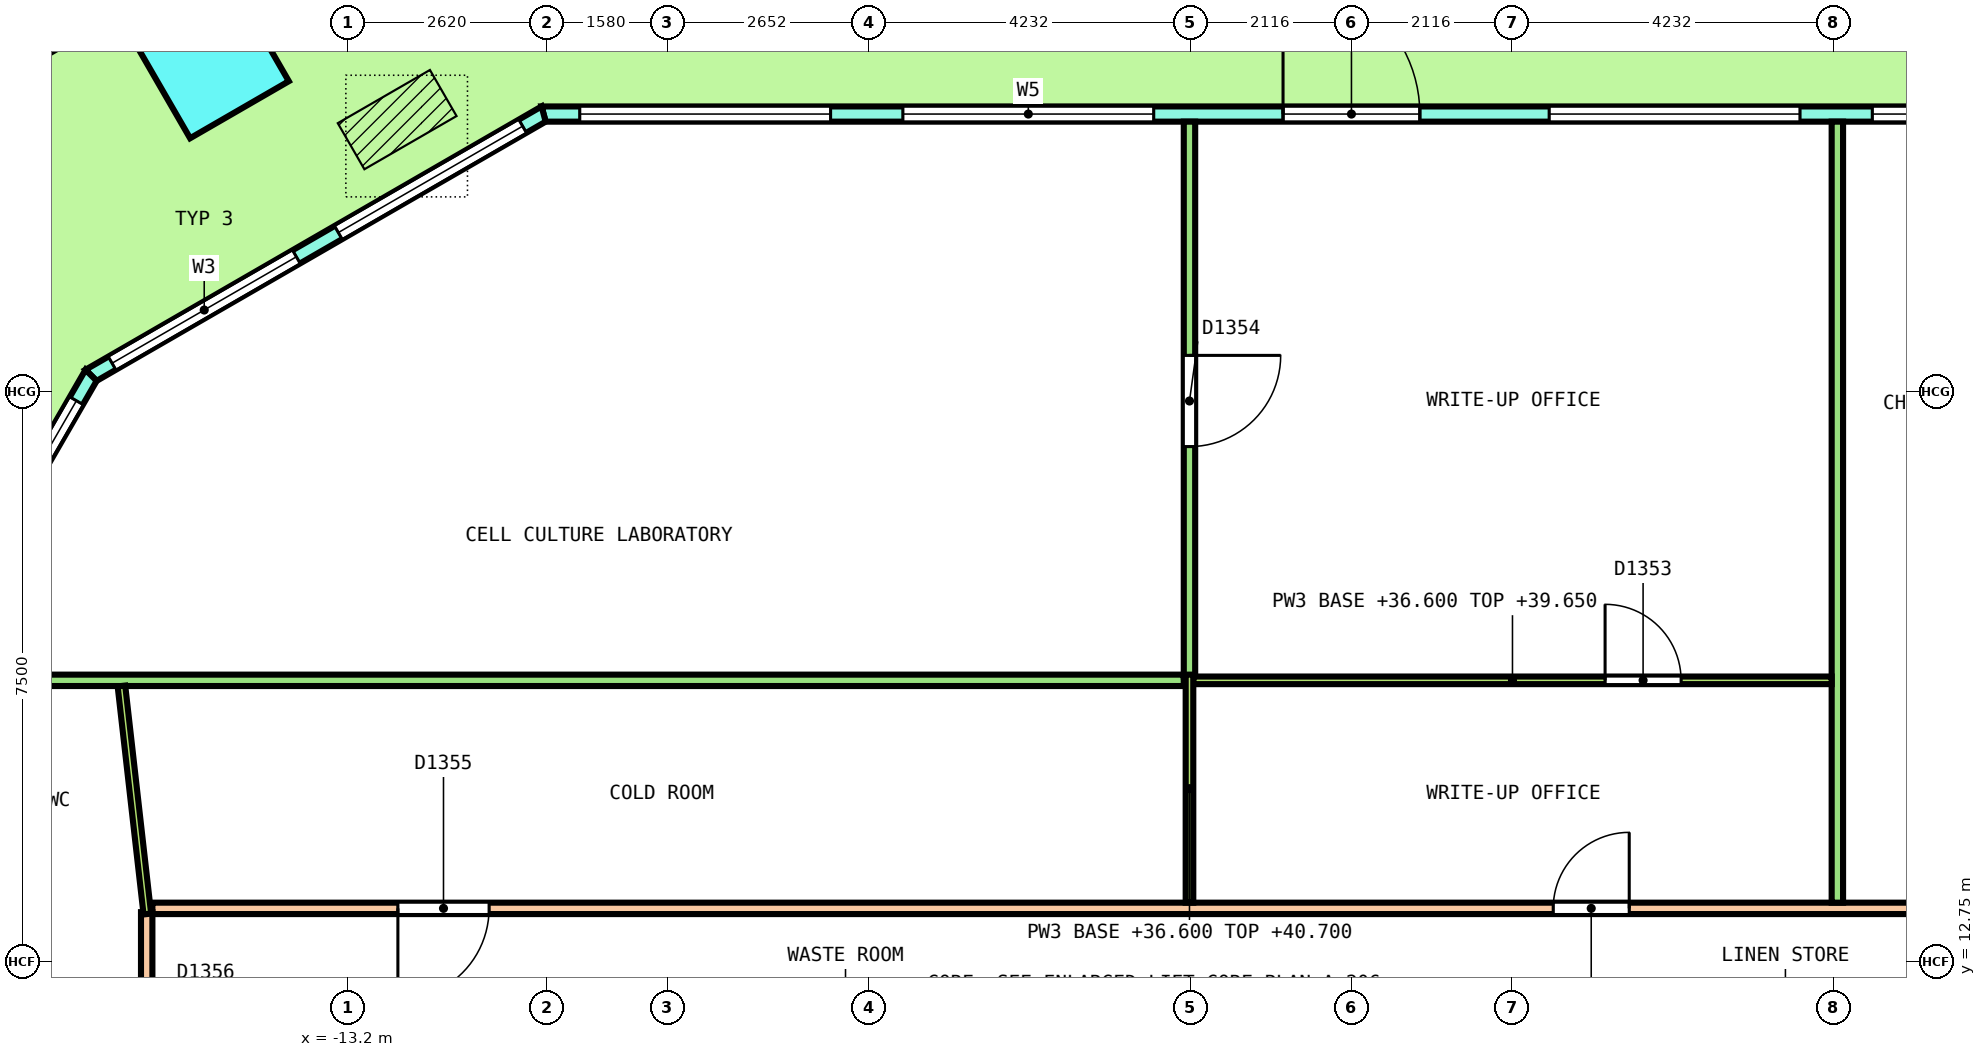
"""IFC4 building model, lengths in metres.
Left out: names, types, materials, properties, quantities, classifications, styles, units other than length and angle.
Written with IfcOpenShell. Run it as: python <this file> out.ifc"""

import sys

from ifc_helpers import new_model, si_unit, direction, frame, frame_2d, origin, origin_2d, place, context, subcontext, project, spatial, polyline, rectangle, outline, extrude, element, fill, save


model = new_model("IFC4")
c1 = context("Model", 3, precision=1e-05, world=origin(), true_north=direction((0.0, 1.0)))
c2 = subcontext(c1, "Body", "Model", "MODEL_VIEW")
j1 = project(units=[si_unit("LENGTHUNIT", "METRE"), si_unit("PLANEANGLEUNIT", "RADIAN")], contexts=[c1])
p1 = place(None, origin())
s1 = spatial("IfcSite", under=j1, at=p1, CompositionType="ELEMENT")
p2 = place(p1, origin())
s2 = spatial("IfcBuilding", under=s1, at=p2, CompositionType="ELEMENT")
p3 = place(p2, frame((0.0, 0.0, 36.6)))
s3 = spatial("IfcBuildingStorey", under=s2, at=p3, CompositionType="ELEMENT", Elevation=36.6)
p4 = place(p3, frame((-15.005, 24.606, 0.0), z_axis=(-0.036267419622, 0.0, 0.999342120734), x_axis=(-0.865313477853, -0.500246354177, -0.031403346616)))
e1 = element("IfcColumn", 1, at=p4, inside=s3, PredefinedType="COLUMN", context=c2, shape_type="SweptSolid", body=[
    extrude(rectangle(XDim=1.5, YDim=1.5, at=origin_2d()), origin(), (0.0, 0.0, 1.0), 4.052),
])
p5 = place(p3, frame((10.628, 23.9, 0.0), z_axis=(0.0, 0.0, 1.0), x_axis=(-1.0, 0.0, 0.0)))
e2 = element("IfcWall", 2, at=p5, inside=s3, PredefinedType="SOLIDWALL", context=c2, shape_type="SweptSolid", body=[
    extrude(outline(polyline([(-0.027, -0.1), (0.988, -0.1), (2.003, -0.1), (3.017, -0.1), (4.032, -0.1), (5.047, -0.1), (6.062, -0.1), (7.076, -0.1), (8.091, -0.1), (9.106, -0.1), (10.121, -0.1), (11.135, -0.1), (12.15, -0.1), (13.165, -0.1), (14.179, -0.1), (15.194, -0.1), (16.209, -0.1), (17.224, -0.1), (18.239, -0.1), (19.253, -0.1), (20.268, -0.1), (21.283, -0.1), (21.229, 0.1), (20.219, 0.1), (19.21, 0.1), (18.2, 0.1), (17.19, 0.1), (16.181, 0.1), (15.171, 0.1), (14.162, 0.1), (13.152, 0.1), (12.142, 0.1), (11.133, 0.1), (10.123, 0.1), (9.114, 0.1), (8.104, 0.1), (7.094, 0.1), (6.085, 0.1), (5.075, 0.1), (4.065, 0.1), (3.056, 0.1), (2.046, 0.1), (1.036, 0.1), (0.027, 0.1), (-0.027, -0.1)])), origin(), (0.0, 0.0, 1.0), 4.1),
])
p6 = place(p5, frame((0.476, 0.0, 0.1)))
e3 = element("IfcOpeningElement", 3, at=p6, cuts=e2, PredefinedType="OPENING", context=c2, shape_type="SweptSolid", body=[
    extrude(rectangle(XDim=3.3, YDim=2.9, at=frame_2d((1.65, 1.45))), frame((0.0, 0.11, 0.0), z_axis=(0.0, -1.0, 0.0), x_axis=(1.0, 0.0, 0.0)), (0.0, 0.0, 1.0), 0.22),
])
p7 = place(p5, frame((4.727, 0.0, 0.1)))
e4 = element("IfcOpeningElement", 4, at=p7, cuts=e2, PredefinedType="OPENING", context=c2, shape_type="SweptSolid", body=[
    extrude(rectangle(XDim=3.3, YDim=2.9, at=frame_2d((1.65, 1.45))), frame((0.0, 0.11, 0.0), z_axis=(0.0, -1.0, 0.0), x_axis=(1.0, 0.0, 0.0)), (0.0, 0.0, 1.0), 0.22),
])
p8 = place(p5, frame((9.728, 0.0, 0.0)))
e5 = element("IfcOpeningElement", 5, at=p8, cuts=e2, PredefinedType="OPENING", context=c2, shape_type="SweptSolid", body=[
    extrude(rectangle(XDim=1.8, YDim=2.4, at=frame_2d((0.9, 1.2))), frame((0.0, 0.11, 0.0), z_axis=(0.0, -1.0, 0.0), x_axis=(1.0, 0.0, 0.0)), (0.0, 0.0, 1.0), 0.22),
])
p9 = place(p5, frame((9.728, 0.0, 2.55)))
e6 = element("IfcOpeningElement", 6, at=p9, cuts=e2, PredefinedType="OPENING", context=c2, shape_type="SweptSolid", body=[
    extrude(rectangle(XDim=1.8, YDim=0.45, at=frame_2d((0.9, 0.225))), frame((0.0, 0.11, 0.0), z_axis=(0.0, -1.0, 0.0), x_axis=(1.0, 0.0, 0.0)), (0.0, 0.0, 1.0), 0.22),
])
p10 = place(p5, frame((13.229, 0.0, 0.1)))
e7 = element("IfcOpeningElement", 7, at=p10, cuts=e2, PredefinedType="OPENING", context=c2, shape_type="SweptSolid", body=[
    extrude(rectangle(XDim=3.3, YDim=2.9, at=frame_2d((1.65, 1.45))), frame((0.0, 0.11, 0.0), z_axis=(0.0, -1.0, 0.0), x_axis=(1.0, 0.0, 0.0)), (0.0, 0.0, 1.0), 0.22),
])
p11 = place(p5, frame((17.48, 0.0, 0.1)))
e8 = element("IfcOpeningElement", 8, at=p11, cuts=e2, PredefinedType="OPENING", context=c2, shape_type="SweptSolid", body=[
    extrude(rectangle(XDim=3.3, YDim=2.9, at=frame_2d((1.65, 1.45))), frame((0.0, 0.11, 0.0), z_axis=(0.0, -1.0, 0.0), x_axis=(1.0, 0.0, 0.0)), (0.0, 0.0, 1.0), 0.22),
])
p12 = place(p3, frame((-10.628, 23.9, 0.0), z_axis=(0.0, 0.0, 1.0), x_axis=(-0.866029458321, -0.49999297727, 0.0)))
e9 = element("IfcWall", 9, at=p12, inside=s3, PredefinedType="SOLIDWALL", context=c2, shape_type="SweptSolid", body=[
    extrude(outline(polyline([(-0.027, -0.1), (1.128, -0.1), (2.282, -0.1), (3.437, -0.1), (4.592, -0.1), (5.747, -0.1), (6.901, -0.1), (6.848, 0.1), (5.711, 0.1), (4.574, 0.1), (3.437, 0.1), (2.301, 0.1), (1.164, 0.1), (0.027, 0.1), (-0.027, -0.1)])), origin(), (0.0, 0.0, 1.0), 4.1),
])
p13 = place(p12, frame((0.319, 0.0, 0.1)))
e10 = element("IfcOpeningElement", 10, at=p13, cuts=e9, PredefinedType="OPENING", context=c2, shape_type="SweptSolid", body=[
    extrude(rectangle(XDim=2.8, YDim=2.9, at=frame_2d((1.4, 1.45))), frame((0.0, 0.11, 0.0), z_axis=(0.0, -1.0, 0.0), x_axis=(1.0, 0.0, 0.0)), (0.0, 0.0, 1.0), 0.22),
])
p14 = place(p12, frame((3.756, 0.0, 0.1)))
e11 = element("IfcOpeningElement", 11, at=p14, cuts=e9, PredefinedType="OPENING", context=c2, shape_type="SweptSolid", body=[
    extrude(rectangle(XDim=2.8, YDim=2.9, at=frame_2d((1.4, 1.45))), frame((0.0, 0.11, 0.0), z_axis=(0.0, -1.0, 0.0), x_axis=(1.0, 0.0, 0.0)), (0.0, 0.0, 1.0), 0.22),
])
p15 = place(p3, frame((-16.582, 20.463, 0.0), z_axis=(0.0, 0.0, 1.0), x_axis=(-0.499999588275, -0.866025641494, 0.0)))
e12 = element("IfcWall", 12, at=p15, inside=s3, PredefinedType="SOLIDWALL", context=c2, shape_type="SweptSolid", body=[
    extrude(outline(polyline([(-0.027, -0.1), (1.024, -0.1), (2.075, -0.1), (3.125, -0.1), (4.176, -0.1), (5.227, -0.1), (6.278, -0.1), (7.329, -0.1), (8.38, -0.1), (9.43, -0.1), (10.481, -0.1), (11.532, -0.1), (12.583, -0.1), (13.634, -0.1), (14.685, -0.1), (15.735, -0.1), (16.786, -0.1), (17.837, -0.1), (18.888, -0.1), (18.834, 0.1), (17.789, 0.1), (16.744, 0.1), (15.699, 0.1), (14.655, 0.1), (13.61, 0.1), (12.565, 0.1), (11.52, 0.1), (10.475, 0.1), (9.43, 0.1), (8.385, 0.1), (7.341, 0.1), (6.296, 0.1), (5.251, 0.1), (4.206, 0.1), (3.161, 0.1), (2.116, 0.1), (1.072, 0.1), (0.027, 0.1), (-0.027, -0.1)])), origin(), (0.0, 0.0, 1.0), 4.1),
])
p16 = place(p15, frame((0.386, 0.0, 0.1)))
e13 = element("IfcOpeningElement", 13, at=p16, cuts=e12, PredefinedType="OPENING", context=c2, shape_type="SweptSolid", body=[
    extrude(rectangle(XDim=3.0, YDim=2.9, at=frame_2d((1.5, 1.45))), frame((0.0, 0.11, 0.0), z_axis=(0.0, -1.0, 0.0), x_axis=(1.0, 0.0, 0.0)), (0.0, 0.0, 1.0), 0.22),
])
p17 = place(p15, frame((4.158, 0.0, 0.1)))
e14 = element("IfcOpeningElement", 14, at=p17, cuts=e12, PredefinedType="OPENING", context=c2, shape_type="SweptSolid", body=[
    extrude(rectangle(XDim=3.0, YDim=2.9, at=frame_2d((1.5, 1.45))), frame((0.0, 0.11, 0.0), z_axis=(0.0, -1.0, 0.0), x_axis=(1.0, 0.0, 0.0)), (0.0, 0.0, 1.0), 0.22),
])
p18 = place(p15, frame((8.531, 0.0, 0.0)))
e15 = element("IfcOpeningElement", 15, at=p18, cuts=e12, PredefinedType="OPENING", context=c2, shape_type="SweptSolid", body=[
    extrude(rectangle(XDim=1.8, YDim=2.4, at=frame_2d((0.9, 1.2))), frame((0.0, 0.11, 0.0), z_axis=(0.0, -1.0, 0.0), x_axis=(1.0, 0.0, 0.0)), (0.0, 0.0, 1.0), 0.22),
])
p19 = place(p15, frame((8.531, 0.0, 2.55)))
e16 = element("IfcOpeningElement", 16, at=p19, cuts=e12, PredefinedType="OPENING", context=c2, shape_type="SweptSolid", body=[
    extrude(rectangle(XDim=1.8, YDim=0.45, at=frame_2d((0.9, 0.225))), frame((0.0, 0.11, 0.0), z_axis=(0.0, -1.0, 0.0), x_axis=(1.0, 0.0, 0.0)), (0.0, 0.0, 1.0), 0.22),
])
p20 = place(p15, frame((11.703, 0.0, 0.1)))
e17 = element("IfcOpeningElement", 17, at=p20, cuts=e12, PredefinedType="OPENING", context=c2, shape_type="SweptSolid", body=[
    extrude(rectangle(XDim=3.0, YDim=2.9, at=frame_2d((1.5, 1.45))), frame((0.0, 0.11, 0.0), z_axis=(0.0, -1.0, 0.0), x_axis=(1.0, 0.0, 0.0)), (0.0, 0.0, 1.0), 0.22),
])
p21 = place(p15, frame((15.475, 0.0, 0.1)))
e18 = element("IfcOpeningElement", 18, at=p21, cuts=e12, PredefinedType="OPENING", context=c2, shape_type="SweptSolid", body=[
    extrude(rectangle(XDim=3.0, YDim=2.9, at=frame_2d((1.5, 1.45))), frame((0.0, 0.11, 0.0), z_axis=(0.0, -1.0, 0.0), x_axis=(1.0, 0.0, 0.0)), (0.0, 0.0, 1.0), 0.22),
])
p22 = place(p3, frame((-15.775, 13.45, 0.0), z_axis=(0.0, 0.0, 1.0), x_axis=(1.0, 0.0, 0.0)))
e19 = element("IfcWall", 19, at=p22, inside=s3, PredefinedType="PARTITIONING", context=c2, shape_type="SweptSolid", body=[
    extrude(rectangle(XDim=31.55, YDim=0.15, at=frame_2d((15.775, 0.0))), origin(), (0.0, 0.0, 1.0), 3.05),
])
p23 = place(p22, frame((28.527, 0.0, 0.0)))
e20 = element("IfcOpeningElement", 20, at=p23, cuts=e19, PredefinedType="OPENING", context=c2, shape_type="SweptSolid", body=[
    extrude(rectangle(XDim=1.0, YDim=2.1, at=frame_2d((0.5, 1.05))), frame((0.0, 0.085, 0.0), z_axis=(0.0, -1.0, 0.0), x_axis=(1.0, 0.0, 0.0)), (0.0, 0.0, 1.0), 0.17),
])
p24 = place(p22, frame((24.289, 0.0, 0.0)))
e21 = element("IfcOpeningElement", 21, at=p24, cuts=e19, PredefinedType="OPENING", context=c2, shape_type="SweptSolid", body=[
    extrude(rectangle(XDim=1.2, YDim=2.1, at=frame_2d((0.6, 1.05))), frame((0.0, 0.085, 0.0), z_axis=(0.0, -1.0, 0.0), x_axis=(1.0, 0.0, 0.0)), (0.0, 0.0, 1.0), 0.17),
])
p25 = place(p22, frame((18.429, 0.0, 0.0)))
e22 = element("IfcOpeningElement", 22, at=p25, cuts=e19, PredefinedType="OPENING", context=c2, shape_type="SweptSolid", body=[
    extrude(rectangle(XDim=1.0, YDim=2.1, at=frame_2d((0.5, 1.05))), frame((0.0, 0.085, 0.0), z_axis=(0.0, -1.0, 0.0), x_axis=(1.0, 0.0, 0.0)), (0.0, 0.0, 1.0), 0.17),
])
p26 = place(p22, frame((3.23, 0.0, 0.0)))
e23 = element("IfcOpeningElement", 23, at=p26, cuts=e19, PredefinedType="OPENING", context=c2, shape_type="SweptSolid", body=[
    extrude(rectangle(XDim=1.2, YDim=2.1, at=frame_2d((0.6, 1.05))), frame((0.0, 0.085, 0.0), z_axis=(0.0, -1.0, 0.0), x_axis=(1.0, 0.0, 0.0)), (0.0, 0.0, 1.0), 0.17),
])
p27 = place(p3, frame((-15.85, -13.375, 0.0), z_axis=(0.0, 0.0, 1.0), x_axis=(0.0, 1.0, 0.0)))
e24 = element("IfcWall", 24, at=p27, inside=s3, PredefinedType="PARTITIONING", context=c2, shape_type="SweptSolid", body=[
    extrude(rectangle(XDim=26.775, YDim=0.15, at=frame_2d((13.387, 0.0))), origin(), (0.0, 0.0, 1.0), 3.05),
])
p28 = place(p27, frame((24.693, 0.0, 0.0)))
e25 = element("IfcOpeningElement", 25, at=p28, cuts=e24, PredefinedType="OPENING", context=c2, shape_type="SweptSolid", body=[
    extrude(rectangle(XDim=1.0, YDim=2.1, at=frame_2d((0.5, 1.05))), frame((0.0, 0.085, 0.0), z_axis=(0.0, -1.0, 0.0), x_axis=(1.0, 0.0, 0.0)), (0.0, 0.0, 1.0), 0.17),
])
p29 = place(p27, frame((16.495, 0.0, 0.0)))
e26 = element("IfcOpeningElement", 26, at=p29, cuts=e24, PredefinedType="OPENING", context=c2, shape_type="SweptSolid", body=[
    extrude(rectangle(XDim=1.0, YDim=2.1, at=frame_2d((0.5, 1.05))), frame((0.0, 0.085, 0.0), z_axis=(0.0, -1.0, 0.0), x_axis=(1.0, 0.0, 0.0)), (0.0, 0.0, 1.0), 0.17),
])
p30 = place(p27, frame((6.771, 0.0, 0.0)))
e27 = element("IfcOpeningElement", 27, at=p30, cuts=e24, PredefinedType="OPENING", context=c2, shape_type="SweptSolid", body=[
    extrude(rectangle(XDim=1.0, YDim=2.1, at=frame_2d((0.5, 1.05))), frame((0.0, 0.085, 0.0), z_axis=(0.0, -1.0, 0.0), x_axis=(1.0, 0.0, 0.0)), (0.0, 0.0, 1.0), 0.17),
])
p31 = place(p3, frame((-18.783, 16.45, 0.0), z_axis=(0.0, 0.0, 1.0), x_axis=(1.0, 0.0, 0.0)))
e28 = element("IfcWall", 28, at=p31, inside=s3, PredefinedType="PARTITIONING", context=c2, shape_type="SweptSolid", body=[
    extrude(rectangle(XDim=16.577, YDim=0.15, at=frame_2d((8.289, 0.0))), origin(), (0.0, 0.0, 1.0), 3.05),
])
p32 = place(p3, frame((6.393, 13.525, 0.0), z_axis=(0.0, 0.0, 1.0), x_axis=(0.0, 1.0, 0.0)))
e29 = element("IfcWall", 29, at=p32, inside=s3, PredefinedType="PARTITIONING", context=c2, shape_type="SweptSolid", body=[
    extrude(rectangle(XDim=10.275, YDim=0.15, at=frame_2d((5.138, 0.0))), origin(), (0.0, 0.0, 1.0), 3.05),
])
p33 = place(p3, frame((-2.131, 16.5, 0.0), z_axis=(0.0, 0.0, 1.0), x_axis=(0.0, 1.0, 0.0)))
e30 = element("IfcWall", 30, at=p33, inside=s3, PredefinedType="PARTITIONING", context=c2, shape_type="SweptSolid", body=[
    extrude(rectangle(XDim=7.3, YDim=0.15, at=frame_2d((3.65, 0.0))), origin(), (0.0, 0.0, 1.0), 3.05),
])
p34 = place(p33, frame((3.025, 0.0, 0.0)))
e31 = element("IfcOpeningElement", 31, at=p34, cuts=e30, PredefinedType="OPENING", context=c2, shape_type="SweptSolid", body=[
    extrude(rectangle(XDim=1.2, YDim=2.1, at=frame_2d((0.6, 1.05))), frame((0.0, 0.085, 0.0), z_axis=(0.0, -1.0, 0.0), x_axis=(1.0, 0.0, 0.0)), (0.0, 0.0, 1.0), 0.17),
])
p35 = place(p3, frame((-2.081, 16.45, 0.0), z_axis=(0.0, 0.0, 1.0), x_axis=(1.0, 0.0, 0.0)))
e32 = element("IfcWall", 32, at=p35, inside=s3, PredefinedType="PARTITIONING", context=c2, shape_type="SweptSolid", body=[
    extrude(rectangle(XDim=8.399, YDim=0.1, at=frame_2d((4.199, 0.0))), origin(), (0.0, 0.0, 1.0), 3.05),
])
p36 = place(p35, frame((5.418, 0.0, 0.0)))
e33 = element("IfcOpeningElement", 33, at=p36, cuts=e32, PredefinedType="OPENING", context=c2, shape_type="SweptSolid", body=[
    extrude(rectangle(XDim=1.0, YDim=2.1, at=frame_2d((0.5, 1.05))), frame((0.0, 0.06, 0.0), z_axis=(0.0, -1.0, 0.0), x_axis=(1.0, 0.0, 0.0)), (0.0, 0.0, 1.0), 0.12),
])
p37 = place(p3, frame((-2.131, 13.525, 0.0), z_axis=(0.0, 0.0, 1.0), x_axis=(0.0, 1.0, 0.0)))
e34 = element("IfcWall", 34, at=p37, inside=s3, PredefinedType="PARTITIONING", context=c2, shape_type="SweptSolid", body=[
    extrude(rectangle(XDim=3.0, YDim=0.1, at=frame_2d((1.5, 0.0))), origin(), (0.0, 0.0, 1.0), 4.1),
])
p38 = place(p3, frame((-16.182, 16.375, 0.0), z_axis=(0.0, 0.0, 1.0), x_axis=(0.112800828348, -0.993617619169, 0.0)))
e35 = element("IfcWall", 35, at=p38, inside=s3, PredefinedType="PARTITIONING", context=c2, shape_type="SweptSolid", body=[
    extrude(rectangle(XDim=3.019, YDim=0.1, at=frame_2d((1.51, 0.0))), origin(), (0.0, 0.0, 1.0), 3.05),
])
p39 = place(p6, origin())
e36 = element("IfcWindow", 36, at=p39, inside=s3, PartitioningType="SINGLE_PANEL", PredefinedType="WINDOW", context=c2, shape_type="SweptSolid", body=[
    extrude(rectangle(XDim=3.3, YDim=2.9, at=frame_2d((1.65, 1.45))), frame((0.0, 0.03, 0.0), z_axis=(0.0, -1.0, 0.0), x_axis=(1.0, 0.0, 0.0)), (0.0, 0.0, 1.0), 0.06),
])
fill(e3, e36)
p40 = place(p7, origin())
e37 = element("IfcWindow", 37, at=p40, inside=s3, PartitioningType="SINGLE_PANEL", PredefinedType="WINDOW", context=c2, shape_type="SweptSolid", body=[
    extrude(rectangle(XDim=3.3, YDim=2.9, at=frame_2d((1.65, 1.45))), frame((0.0, 0.03, 0.0), z_axis=(0.0, -1.0, 0.0), x_axis=(1.0, 0.0, 0.0)), (0.0, 0.0, 1.0), 0.06),
])
fill(e4, e37)
p41 = place(p8, origin())
e38 = element("IfcDoor", 38, at=p41, inside=s3, OperationType="DOUBLE_DOOR_SINGLE_SWING", PredefinedType="DOOR", context=c2, shape_type="SweptSolid", body=[
    extrude(rectangle(XDim=1.8, YDim=2.4, at=frame_2d((0.9, 1.2))), frame((0.0, 0.025, 0.0), z_axis=(0.0, -1.0, 0.0), x_axis=(1.0, 0.0, 0.0)), (0.0, 0.0, 1.0), 0.05),
])
fill(e5, e38)
p42 = place(p9, origin())
e39 = element("IfcWindow", 39, at=p42, inside=s3, PartitioningType="SINGLE_PANEL", PredefinedType="WINDOW", context=c2, shape_type="SweptSolid", body=[
    extrude(rectangle(XDim=1.8, YDim=0.45, at=frame_2d((0.9, 0.225))), frame((0.0, 0.03, 0.0), z_axis=(0.0, -1.0, 0.0), x_axis=(1.0, 0.0, 0.0)), (0.0, 0.0, 1.0), 0.06),
])
fill(e6, e39)
p43 = place(p10, origin())
e40 = element("IfcWindow", 40, at=p43, inside=s3, PartitioningType="SINGLE_PANEL", PredefinedType="WINDOW", context=c2, shape_type="SweptSolid", body=[
    extrude(rectangle(XDim=3.3, YDim=2.9, at=frame_2d((1.65, 1.45))), frame((0.0, 0.03, 0.0), z_axis=(0.0, -1.0, 0.0), x_axis=(1.0, 0.0, 0.0)), (0.0, 0.0, 1.0), 0.06),
])
fill(e7, e40)
p44 = place(p11, origin())
e41 = element("IfcWindow", 41, at=p44, inside=s3, PartitioningType="SINGLE_PANEL", PredefinedType="WINDOW", context=c2, shape_type="SweptSolid", body=[
    extrude(rectangle(XDim=3.3, YDim=2.9, at=frame_2d((1.65, 1.45))), frame((0.0, 0.03, 0.0), z_axis=(0.0, -1.0, 0.0), x_axis=(1.0, 0.0, 0.0)), (0.0, 0.0, 1.0), 0.06),
])
fill(e8, e41)
p45 = place(p13, origin())
e42 = element("IfcWindow", 42, at=p45, inside=s3, PartitioningType="SINGLE_PANEL", PredefinedType="WINDOW", context=c2, shape_type="SweptSolid", body=[
    extrude(rectangle(XDim=2.8, YDim=2.9, at=frame_2d((1.4, 1.45))), frame((0.0, 0.03, 0.0), z_axis=(0.0, -1.0, 0.0), x_axis=(1.0, 0.0, 0.0)), (0.0, 0.0, 1.0), 0.06),
])
fill(e10, e42)
p46 = place(p14, origin())
e43 = element("IfcWindow", 43, at=p46, inside=s3, PartitioningType="SINGLE_PANEL", PredefinedType="WINDOW", context=c2, shape_type="SweptSolid", body=[
    extrude(rectangle(XDim=2.8, YDim=2.9, at=frame_2d((1.4, 1.45))), frame((0.0, 0.03, 0.0), z_axis=(0.0, -1.0, 0.0), x_axis=(1.0, 0.0, 0.0)), (0.0, 0.0, 1.0), 0.06),
])
fill(e11, e43)
p47 = place(p16, origin())
e44 = element("IfcWindow", 44, at=p47, inside=s3, PartitioningType="SINGLE_PANEL", PredefinedType="WINDOW", context=c2, shape_type="SweptSolid", body=[
    extrude(rectangle(XDim=3.0, YDim=2.9, at=frame_2d((1.5, 1.45))), frame((0.0, 0.03, 0.0), z_axis=(0.0, -1.0, 0.0), x_axis=(1.0, 0.0, 0.0)), (0.0, 0.0, 1.0), 0.06),
])
fill(e13, e44)
p48 = place(p25, origin())
e45 = element("IfcDoor", 45, at=p48, inside=s3, OperationType="SINGLE_SWING_RIGHT", PredefinedType="DOOR", context=c2, shape_type="SweptSolid", body=[
    extrude(rectangle(XDim=1.0, YDim=2.1, at=frame_2d((0.5, 1.05))), frame((0.0, 0.025, 0.0), z_axis=(0.0, -1.0, 0.0), x_axis=(1.0, 0.0, 0.0)), (0.0, 0.0, 1.0), 0.05),
])
fill(e22, e45)
p49 = place(p36, origin())
e46 = element("IfcDoor", 46, at=p49, inside=s3, OperationType="SINGLE_SWING_LEFT", PredefinedType="DOOR", context=c2, shape_type="SweptSolid", body=[
    extrude(rectangle(XDim=1.0, YDim=2.1, at=frame_2d((0.5, 1.05))), frame((0.0, 0.025, 0.0), z_axis=(0.0, -1.0, 0.0), x_axis=(1.0, 0.0, 0.0)), (0.0, 0.0, 1.0), 0.05),
])
fill(e33, e46)
p50 = place(p34, origin())
e47 = element("IfcDoor", 47, at=p50, inside=s3, OperationType="DOUBLE_DOOR_SINGLE_SWING", PredefinedType="DOOR", context=c2, shape_type="SweptSolid", body=[
    extrude(rectangle(XDim=1.2, YDim=2.1, at=frame_2d((0.6, 1.05))), frame((0.0, 0.025, 0.0), z_axis=(0.0, -1.0, 0.0), x_axis=(1.0, 0.0, 0.0)), (0.0, 0.0, 1.0), 0.05),
])
fill(e31, e47)
p51 = place(p26, origin())
e48 = element("IfcDoor", 48, at=p51, inside=s3, OperationType="DOUBLE_DOOR_SINGLE_SWING", PredefinedType="DOOR", context=c2, shape_type="SweptSolid", body=[
    extrude(rectangle(XDim=1.2, YDim=2.1, at=frame_2d((0.6, 1.05))), frame((0.0, 0.025, 0.0), z_axis=(0.0, -1.0, 0.0), x_axis=(1.0, 0.0, 0.0)), (0.0, 0.0, 1.0), 0.05),
])
fill(e23, e48)
save(model, sys.argv[1])
